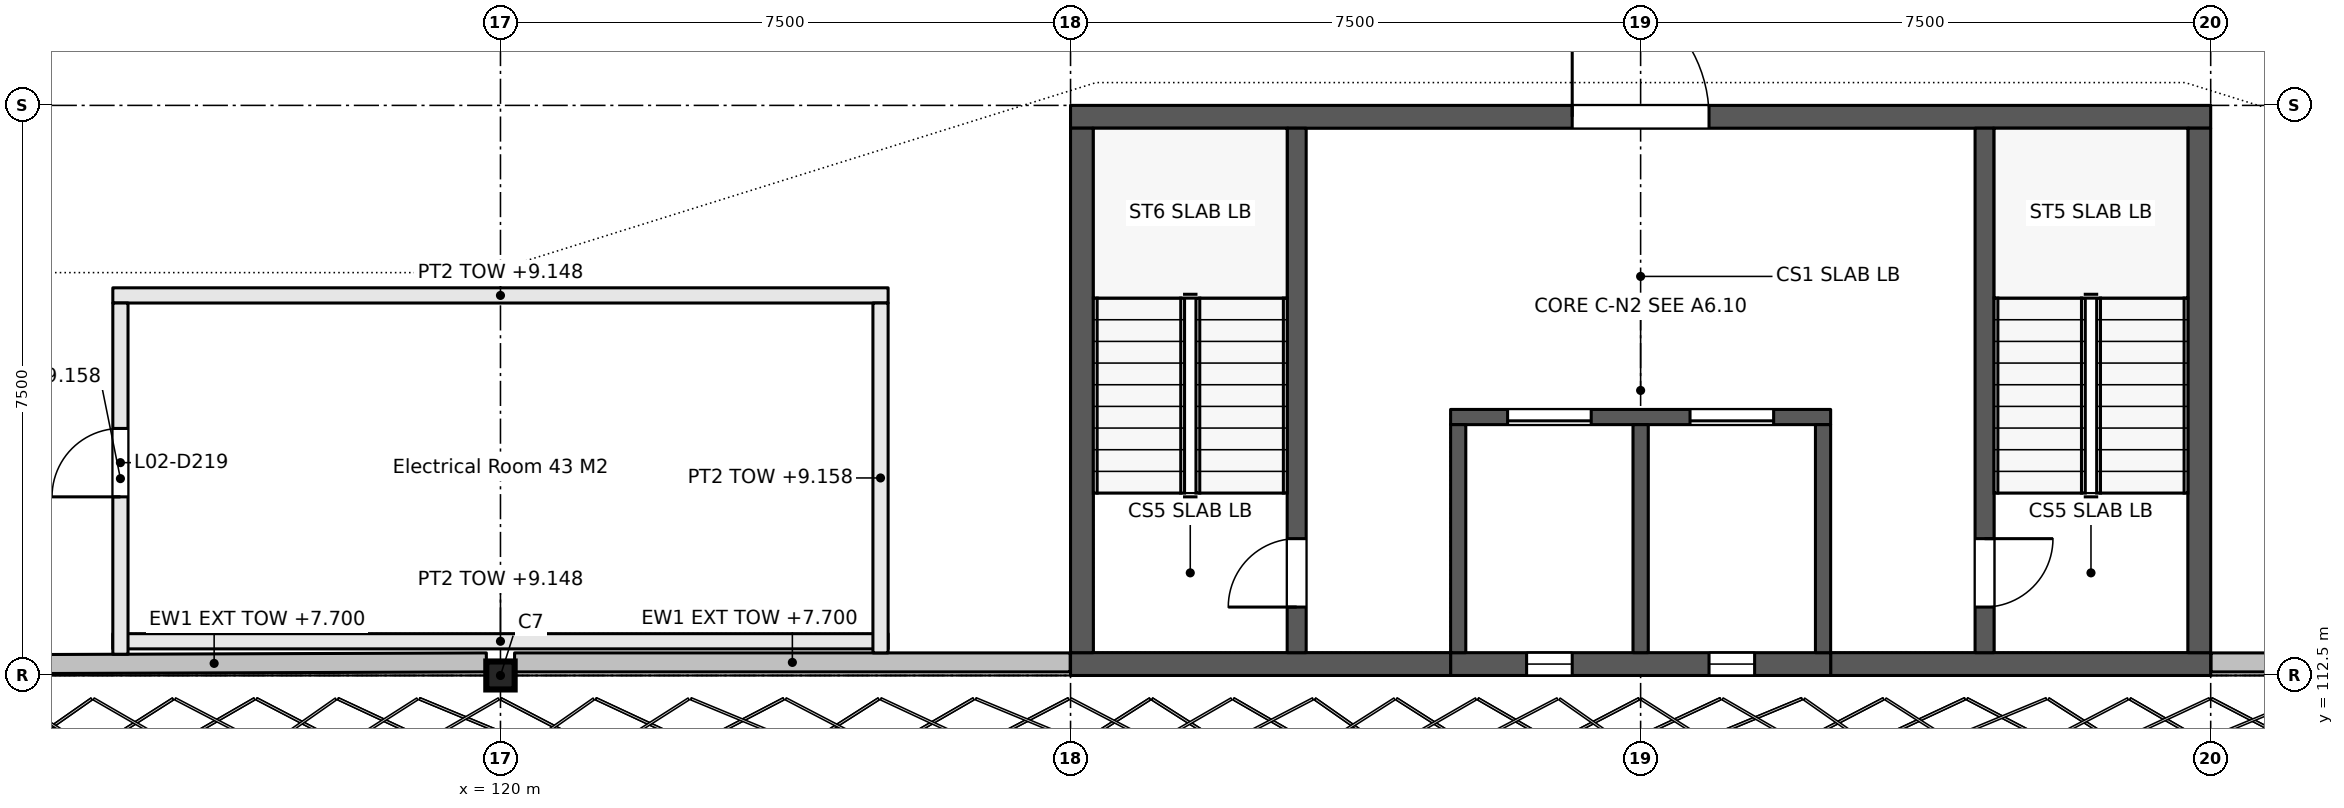
"""IFC4 building model, lengths in metres.
Left out: names, types, materials, properties, quantities, classifications, styles, units other than length and angle.
Written with IfcOpenShell. Run it as: python <this file> out.ifc"""

import sys

from ifc_helpers import new_model, si_unit, direction, frame, frame_2d, origin, origin_2d, place, context, subcontext, project, spatial, rectangle, i_section, extrude, element, fill, save


model = new_model("IFC4")
c1 = context("Model", 3, precision=1e-05, world=origin(), true_north=direction((0.0, 1.0)))
c2 = subcontext(c1, "Body", "Model", "MODEL_VIEW")
j1 = project(units=[si_unit("LENGTHUNIT", "METRE"), si_unit("PLANEANGLEUNIT", "RADIAN")], contexts=[c1])
p1 = place(None, origin())
s1 = spatial("IfcSite", under=j1, at=p1, CompositionType="ELEMENT")
p2 = place(p1, origin())
s2 = spatial("IfcBuilding", under=s1, at=p2, CompositionType="ELEMENT")
p3 = place(p2, frame((0.0, 0.0, 6.6)))
s3 = spatial("IfcBuildingStorey", under=s2, at=p3, CompositionType="ELEMENT", Elevation=6.6)
p4 = place(p3, frame((120.0, 112.5, 0.0), z_axis=(0.0, 0.0, 1.0), x_axis=(1.0, 0.0, 0.0)))
e1 = element("IfcColumn", 1, at=p4, inside=s3, PredefinedType="COLUMN", context=c2, shape_type="SweptSolid", body=[
    extrude(i_section(OverallWidth=0.373, OverallDepth=0.368, WebThickness=0.015, FlangeThickness=0.024, FilletRadius=0.015, at=origin_2d()), origin(), (0.0, 0.0, 1.0), 3.3),
])
for number, where, z_axis, x_axis in (
    (2, (114.9, 112.95, 0.0), (0.0, 0.0, 1.0), (1.0, 0.0, 0.0)),
    (3, (114.9, 117.5, 0.0), (0.0, 0.0, 1.0), (1.0, 0.0, 0.0)),
):
    element("IfcWall", number, at=place(p3, frame(where, z_axis=z_axis, x_axis=x_axis)), inside=s3, PredefinedType="PARTITIONING", context=c2, shape_type="SweptSolid", body=[
        extrude(rectangle(XDim=10.2, YDim=0.2, at=frame_2d((5.1, 0.0))), origin(), (0.0, 0.0, 1.0), 2.548),
    ])
p5 = place(p3, frame((115.0, 112.779, 0.0), z_axis=(0.0, 0.0, 1.0), x_axis=(0.0, 1.0, 0.0)))
e4 = element("IfcWall", 4, at=p5, inside=s3, PredefinedType="PARTITIONING", context=c2, shape_type="SweptSolid", body=[
    extrude(rectangle(XDim=4.621, YDim=0.2, at=frame_2d((2.31, 0.0))), origin(), (0.0, 0.0, 1.0), 2.558),
])
p6 = place(p5, frame((2.071, 0.0, 0.0)))
e5 = element("IfcOpeningElement", 5, at=p6, cuts=e4, PredefinedType="OPENING", context=c2, shape_type="SweptSolid", body=[
    extrude(rectangle(XDim=0.9, YDim=2.1, at=frame_2d((0.45, 1.05))), frame((0.0, 0.11, 0.0), z_axis=(0.0, -1.0, 0.0), x_axis=(1.0, 0.0, 0.0)), (0.0, 0.0, 1.0), 0.22),
])
p7 = place(p3, frame((125.0, 112.797, 0.0), z_axis=(0.0, 0.0, 1.0), x_axis=(0.0, 1.0, 0.0)))
e6 = element("IfcWall", 6, at=p7, inside=s3, PredefinedType="PARTITIONING", context=c2, shape_type="SweptSolid", body=[
    extrude(rectangle(XDim=4.603, YDim=0.2, at=frame_2d((2.301, 0.0))), origin(), (0.0, 0.0, 1.0), 2.558),
])
p8 = place(p3, frame((112.652, 112.646, 0.0), z_axis=(0.0, 0.0, 1.0), x_axis=(0.999993224794, 0.003681082119, 0.0)))
e7 = element("IfcWall", 7, at=p8, inside=s3, PredefinedType="SOLIDWALL", context=c2, shape_type="SweptSolid", body=[
    extrude(rectangle(XDim=7.163, YDim=0.25, at=frame_2d((3.582, 0.0))), origin(), (0.0, 0.0, 1.0), 1.1),
])
for number, where, z_axis, x_axis in (
    (8, (120.186, 112.672, 0.0), (0.0, 0.0, 1.0), (1.0, 0.0, 0.0)),
    (9, (142.505, 112.672, 0.0), (0.0, 0.0, 1.0), (1.0, 0.0, 0.0)),
):
    element("IfcWall", number, at=place(p3, frame(where, z_axis=z_axis, x_axis=x_axis)), inside=s3, PredefinedType="SOLIDWALL", context=c2, shape_type="SweptSolid", body=[
        extrude(rectangle(XDim=7.31, YDim=0.25, at=frame_2d((3.655, 0.0))), origin(), (0.0, 0.0, 1.0), 1.1),
    ])
p9 = place(p3, frame((127.5, 119.85, 0.0), z_axis=(0.0, 0.0, 1.0), x_axis=(1.0, 0.0, 0.0)))
e10 = element("IfcWall", 10, at=p9, inside=s3, PredefinedType="SHEAR", context=c2, shape_type="SweptSolid", body=[
    extrude(rectangle(XDim=15.0, YDim=0.3, at=frame_2d((7.5, 0.0))), origin(), (0.0, 0.0, 1.0), 3.3),
])
p10 = place(p9, frame((6.6, 0.0, 0.0)))
e11 = element("IfcOpeningElement", 11, at=p10, cuts=e10, PredefinedType="OPENING", context=c2, shape_type="SweptSolid", body=[
    extrude(rectangle(XDim=1.8, YDim=2.1, at=frame_2d((0.9, 1.05))), frame((0.0, 0.16, 0.0), z_axis=(0.0, -1.0, 0.0), x_axis=(1.0, 0.0, 0.0)), (0.0, 0.0, 1.0), 0.32),
])
p11 = place(p3, frame((142.5, 112.65, 0.0), z_axis=(0.0, 0.0, 1.0), x_axis=(-1.0, 0.0, 0.0)))
e12 = element("IfcWall", 12, at=p11, inside=s3, PredefinedType="SHEAR", context=c2, shape_type="SweptSolid", body=[
    extrude(rectangle(XDim=5.0, YDim=0.3, at=frame_2d((2.5, 0.0))), origin(), (0.0, 0.0, 1.0), 3.3),
])
p12 = place(p3, frame((137.5, 112.65, 0.0), z_axis=(0.0, 0.0, 1.0), x_axis=(-1.0, 0.0, 0.0)))
e13 = element("IfcWall", 13, at=p12, inside=s3, PredefinedType="SHEAR", context=c2, shape_type="SweptSolid", body=[
    extrude(rectangle(XDim=5.0, YDim=0.3, at=frame_2d((2.5, 0.0))), origin(), (0.0, 0.0, 1.0), 3.3),
])
p13 = place(p12, frame((1.0, 0.0, 0.3)))
e14 = element("IfcOpeningElement", 14, at=p13, cuts=e13, PredefinedType="OPENING", context=c2, shape_type="SweptSolid", body=[
    extrude(rectangle(XDim=0.6, YDim=2.7, at=frame_2d((0.3, 1.35))), frame((0.0, 0.16, 0.0), z_axis=(0.0, -1.0, 0.0), x_axis=(1.0, 0.0, 0.0)), (0.0, 0.0, 1.0), 0.32),
])
p14 = place(p12, frame((3.4, 0.0, 0.3)))
e15 = element("IfcOpeningElement", 15, at=p14, cuts=e13, PredefinedType="OPENING", context=c2, shape_type="SweptSolid", body=[
    extrude(rectangle(XDim=0.6, YDim=2.7, at=frame_2d((0.3, 1.35))), frame((0.0, 0.16, 0.0), z_axis=(0.0, -1.0, 0.0), x_axis=(1.0, 0.0, 0.0)), (0.0, 0.0, 1.0), 0.32),
])
p15 = place(p3, frame((132.5, 112.65, 0.0), z_axis=(0.0, 0.0, 1.0), x_axis=(-1.0, 0.0, 0.0)))
e16 = element("IfcWall", 16, at=p15, inside=s3, PredefinedType="SHEAR", context=c2, shape_type="SweptSolid", body=[
    extrude(rectangle(XDim=5.0, YDim=0.3, at=frame_2d((2.5, 0.0))), origin(), (0.0, 0.0, 1.0), 3.3),
])
for number, where, z_axis, x_axis in (
    (17, (142.35, 119.7, 0.0), (0.0, 0.0, 1.0), (0.0, -1.0, 0.0)),
    (18, (127.65, 119.7, 0.0), (0.0, 0.0, 1.0), (0.0, -1.0, 0.0)),
):
    element("IfcWall", number, at=place(p3, frame(where, z_axis=z_axis, x_axis=x_axis)), inside=s3, PredefinedType="SHEAR", context=c2, shape_type="SweptSolid", body=[
        extrude(rectangle(XDim=6.9, YDim=0.3, at=frame_2d((3.45, 0.0))), origin(), (0.0, 0.0, 1.0), 3.3),
    ])
p16 = place(p3, frame((139.525, 119.7, 0.0), z_axis=(0.0, 0.0, 1.0), x_axis=(0.0, -1.0, 0.0)))
e19 = element("IfcWall", 19, at=p16, inside=s3, PredefinedType="STANDARD", context=c2, shape_type="SweptSolid", body=[
    extrude(rectangle(XDim=6.9, YDim=0.25, at=frame_2d((3.45, 0.0))), origin(), (0.0, 0.0, 1.0), 3.1),
])
p17 = place(p16, frame((5.4, 0.0, 0.0)))
e20 = element("IfcOpeningElement", 20, at=p17, cuts=e19, PredefinedType="OPENING", context=c2, shape_type="SweptSolid", body=[
    extrude(rectangle(XDim=0.9, YDim=2.1, at=frame_2d((0.45, 1.05))), frame((0.0, 0.135, 0.0), z_axis=(0.0, -1.0, 0.0), x_axis=(1.0, 0.0, 0.0)), (0.0, 0.0, 1.0), 0.27),
])
p18 = place(p3, frame((130.475, 112.8, 0.0), z_axis=(0.0, 0.0, 1.0), x_axis=(0.0, 1.0, 0.0)))
e21 = element("IfcWall", 21, at=p18, inside=s3, PredefinedType="STANDARD", context=c2, shape_type="SweptSolid", body=[
    extrude(rectangle(XDim=6.9, YDim=0.25, at=frame_2d((3.45, 0.0))), origin(), (0.0, 0.0, 1.0), 3.1),
])
p19 = place(p18, frame((0.6, 0.0, 0.0)))
e22 = element("IfcOpeningElement", 22, at=p19, cuts=e21, PredefinedType="OPENING", context=c2, shape_type="SweptSolid", body=[
    extrude(rectangle(XDim=0.9, YDim=2.1, at=frame_2d((0.45, 1.05))), frame((0.0, 0.135, 0.0), z_axis=(0.0, -1.0, 0.0), x_axis=(1.0, 0.0, 0.0)), (0.0, 0.0, 1.0), 0.27),
])
p20 = place(p3, frame((137.5, 115.9, 0.0), z_axis=(0.0, 0.0, 1.0), x_axis=(-1.0, 0.0, 0.0)))
e23 = element("IfcWall", 23, at=p20, inside=s3, PredefinedType="STANDARD", context=c2, shape_type="SweptSolid", body=[
    extrude(rectangle(XDim=5.0, YDim=0.2, at=frame_2d((2.5, 0.0))), origin(), (0.0, 0.0, 1.0), 3.1),
])
p21 = place(p20, frame((0.75, 0.0, 0.0)))
e24 = element("IfcOpeningElement", 24, at=p21, cuts=e23, PredefinedType="OPENING", context=c2, shape_type="SweptSolid", body=[
    extrude(rectangle(XDim=1.1, YDim=2.1, at=frame_2d((0.55, 1.05))), frame((0.0, 0.11, 0.0), z_axis=(0.0, -1.0, 0.0), x_axis=(1.0, 0.0, 0.0)), (0.0, 0.0, 1.0), 0.22),
])
p22 = place(p20, frame((3.15, 0.0, 0.0)))
e25 = element("IfcOpeningElement", 25, at=p22, cuts=e23, PredefinedType="OPENING", context=c2, shape_type="SweptSolid", body=[
    extrude(rectangle(XDim=1.1, YDim=2.1, at=frame_2d((0.55, 1.05))), frame((0.0, 0.11, 0.0), z_axis=(0.0, -1.0, 0.0), x_axis=(1.0, 0.0, 0.0)), (0.0, 0.0, 1.0), 0.22),
])
for number, where, z_axis, x_axis in (
    (26, (137.4, 115.8, 0.0), (0.0, 0.0, 1.0), (0.0, -1.0, 0.0)),
    (27, (135.0, 115.8, 0.0), (0.0, 0.0, 1.0), (0.0, -1.0, 0.0)),
    (28, (132.6, 115.8, 0.0), (0.0, 0.0, 1.0), (0.0, -1.0, 0.0)),
):
    element("IfcWall", number, at=place(p3, frame(where, z_axis=z_axis, x_axis=x_axis)), inside=s3, PredefinedType="STANDARD", context=c2, shape_type="SweptSolid", body=[
        extrude(rectangle(XDim=3.0, YDim=0.2, at=frame_2d((1.5, 0.0))), origin(), (0.0, 0.0, 1.0), 3.1),
    ])
p23 = place(p6, origin())
e29 = element("IfcDoor", 29, at=p23, inside=s3, OperationType="SINGLE_SWING_RIGHT", PredefinedType="DOOR", context=c2, shape_type="SweptSolid", body=[
    extrude(rectangle(XDim=0.9, YDim=2.1, at=frame_2d((0.45, 1.05))), frame((0.0, 0.025, 0.0), z_axis=(0.0, -1.0, 0.0), x_axis=(1.0, 0.0, 0.0)), (0.0, 0.0, 1.0), 0.05),
])
fill(e5, e29)
p24 = place(p10, origin())
e30 = element("IfcDoor", 30, at=p24, inside=s3, OperationType="DOUBLE_DOOR_SINGLE_SWING", PredefinedType="DOOR", context=c2, shape_type="SweptSolid", body=[
    extrude(rectangle(XDim=1.8, YDim=2.1, at=frame_2d((0.9, 1.05))), frame((0.0, 0.025, 0.0), z_axis=(0.0, -1.0, 0.0), x_axis=(1.0, 0.0, 0.0)), (0.0, 0.0, 1.0), 0.05),
])
fill(e11, e30)
p25 = place(p17, origin())
e31 = element("IfcDoor", 31, at=p25, inside=s3, OperationType="SINGLE_SWING_LEFT", PredefinedType="DOOR", context=c2, shape_type="SweptSolid", body=[
    extrude(rectangle(XDim=0.9, YDim=2.1, at=frame_2d((0.45, 1.05))), frame((0.0, 0.025, 0.0), z_axis=(0.0, -1.0, 0.0), x_axis=(1.0, 0.0, 0.0)), (0.0, 0.0, 1.0), 0.05),
])
fill(e20, e31)
p26 = place(p19, origin())
e32 = element("IfcDoor", 32, at=p26, inside=s3, OperationType="SINGLE_SWING_RIGHT", PredefinedType="DOOR", context=c2, shape_type="SweptSolid", body=[
    extrude(rectangle(XDim=0.9, YDim=2.1, at=frame_2d((0.45, 1.05))), frame((0.0, 0.025, 0.0), z_axis=(0.0, -1.0, 0.0), x_axis=(1.0, 0.0, 0.0)), (0.0, 0.0, 1.0), 0.05),
])
fill(e22, e32)
p27 = place(p21, origin())
e33 = element("IfcDoor", 33, at=p27, inside=s3, OperationType="DOUBLE_DOOR_SLIDING", PredefinedType="DOOR", context=c2, shape_type="SweptSolid", body=[
    extrude(rectangle(XDim=1.1, YDim=2.1, at=frame_2d((0.55, 1.05))), frame((0.0, 0.025, 0.0), z_axis=(0.0, -1.0, 0.0), x_axis=(1.0, 0.0, 0.0)), (0.0, 0.0, 1.0), 0.05),
])
fill(e24, e33)
p28 = place(p22, origin())
e34 = element("IfcDoor", 34, at=p28, inside=s3, OperationType="DOUBLE_DOOR_SLIDING", PredefinedType="DOOR", context=c2, shape_type="SweptSolid", body=[
    extrude(rectangle(XDim=1.1, YDim=2.1, at=frame_2d((0.55, 1.05))), frame((0.0, 0.025, 0.0), z_axis=(0.0, -1.0, 0.0), x_axis=(1.0, 0.0, 0.0)), (0.0, 0.0, 1.0), 0.05),
])
fill(e25, e34)
p29 = place(p13, origin())
e35 = element("IfcWindow", 35, at=p29, inside=s3, PartitioningType="SINGLE_PANEL", PredefinedType="WINDOW", context=c2, shape_type="SweptSolid", body=[
    extrude(rectangle(XDim=0.6, YDim=2.7, at=frame_2d((0.3, 1.35))), frame((0.0, 0.03, 0.0), z_axis=(0.0, -1.0, 0.0), x_axis=(1.0, 0.0, 0.0)), (0.0, 0.0, 1.0), 0.06),
])
fill(e14, e35)
p30 = place(p14, origin())
e36 = element("IfcWindow", 36, at=p30, inside=s3, PartitioningType="SINGLE_PANEL", PredefinedType="WINDOW", context=c2, shape_type="SweptSolid", body=[
    extrude(rectangle(XDim=0.6, YDim=2.7, at=frame_2d((0.3, 1.35))), frame((0.0, 0.03, 0.0), z_axis=(0.0, -1.0, 0.0), x_axis=(1.0, 0.0, 0.0)), (0.0, 0.0, 1.0), 0.06),
])
fill(e15, e36)
save(model, sys.argv[1])
